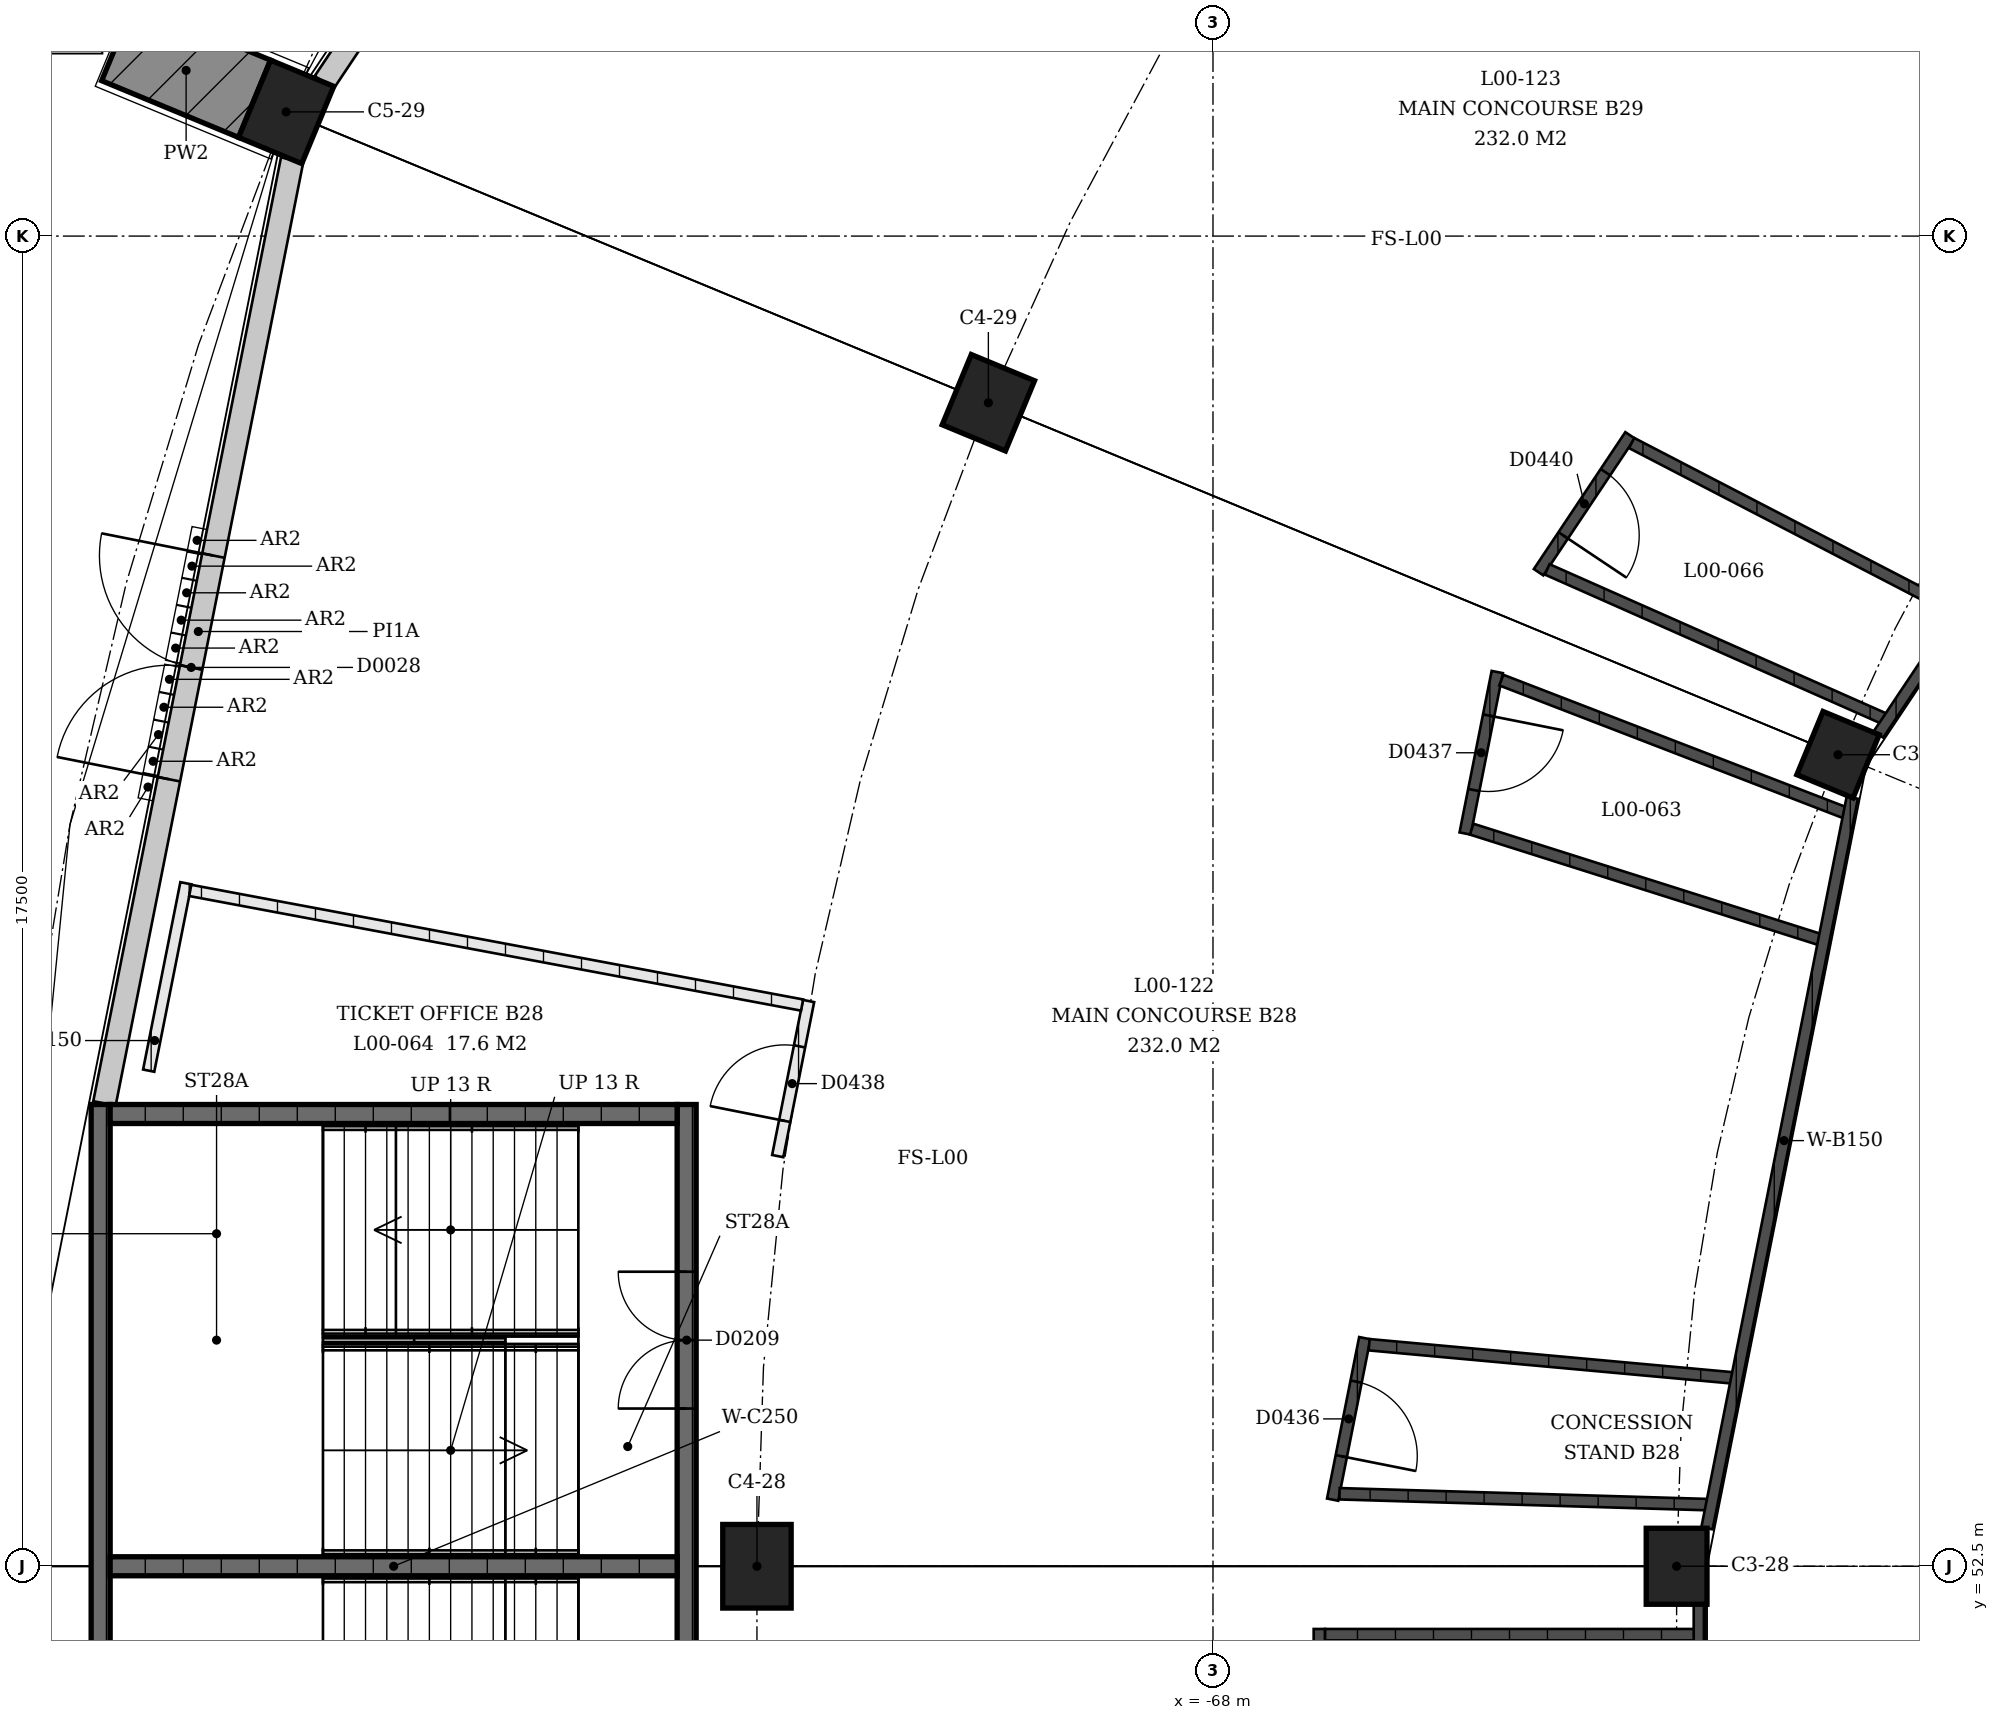
"""IFC4 building model, lengths in metres.
Left out: names, types, materials, properties, quantities, classifications, styles, units other than length and angle.
Written with IfcOpenShell. Run it as: python <this file> out.ifc"""

import sys

from ifc_helpers import new_model, si_unit, direction, frame, frame_2d, origin, origin_2d, place, context, subcontext, project, spatial, rectangle, extrude, element, fill, save


model = new_model("IFC4")
c1 = context("Model", 3, precision=1e-05, world=origin(), true_north=direction((0.0, 1.0)))
c2 = subcontext(c1, "Body", "Model", "MODEL_VIEW")
j1 = project(units=[si_unit("LENGTHUNIT", "METRE"), si_unit("PLANEANGLEUNIT", "RADIAN")], contexts=[c1])
p1 = place(None, origin())
s1 = spatial("IfcSite", under=j1, at=p1, CompositionType="ELEMENT")
p2 = place(p1, origin())
s2 = spatial("IfcBuilding", under=s1, at=p2, CompositionType="ELEMENT")
p3 = place(p2, origin())
s3 = spatial("IfcBuildingStorey", under=s2, at=p3, CompositionType="ELEMENT", Elevation=0.0)
p4 = place(p3, frame((-61.9, 52.5, 0.0), z_axis=(0.0, 0.0, 1.0), x_axis=(0.0, -1.0, 0.0)))
e1 = element("IfcColumn", 1, at=p4, inside=s3, PredefinedType="COLUMN", context=c2, shape_type="SweptSolid", body=[
    extrude(rectangle(XDim=1.0, YDim=0.8, at=origin_2d()), origin(), (0.0, 0.0, 1.0), 4.5),
])
p5 = place(p3, frame((-74.0, 52.5, 0.0), z_axis=(0.0, 0.0, 1.0), x_axis=(0.0, -1.0, 0.0)))
e2 = element("IfcColumn", 2, at=p5, inside=s3, PredefinedType="COLUMN", context=c2, shape_type="SweptSolid", body=[
    extrude(rectangle(XDim=1.1, YDim=0.9, at=origin_2d()), origin(), (0.0, 0.0, 1.0), 4.5),
])
p6 = place(p3, frame((-59.776, 63.177, 0.0), z_axis=(0.0, 0.0, 1.0), x_axis=(-0.382683432365, -0.923879532511, 0.0)))
e3 = element("IfcColumn", 3, at=p6, inside=s3, PredefinedType="COLUMN", context=c2, shape_type="SweptSolid", body=[
    extrude(rectangle(XDim=0.9, YDim=0.8, at=origin_2d()), origin(), (0.0, 0.0, 1.0), 4.5),
])
p7 = place(p3, frame((-70.955, 67.807, 0.0), z_axis=(0.0, 0.0, 1.0), x_axis=(-0.382683432365, -0.923879532511, 0.0)))
e4 = element("IfcColumn", 4, at=p7, inside=s3, PredefinedType="COLUMN", context=c2, shape_type="SweptSolid", body=[
    extrude(rectangle(XDim=1.0, YDim=0.9, at=origin_2d()), origin(), (0.0, 0.0, 1.0), 4.5),
])
p8 = place(p3, frame((-80.194, 71.634, 0.0), z_axis=(0.0, 0.0, 1.0), x_axis=(-0.382683432365, -0.923879532511, 0.0)))
e5 = element("IfcColumn", 5, at=p8, inside=s3, PredefinedType="COLUMN", context=c2, shape_type="SweptSolid", body=[
    extrude(rectangle(XDim=1.1, YDim=0.9, at=origin_2d()), origin(), (0.0, 0.0, 1.0), 4.5),
])
p9 = place(p3, frame((-82.585, 58.589, 0.0), z_axis=(0.0, 0.0, 1.0), x_axis=(0.195099892294, 0.980783376708, 0.0)))
e6 = element("IfcWall", 6, at=p9, inside=s3, PredefinedType="SOLIDWALL", context=c2, shape_type="SweptSolid", body=[
    extrude(rectangle(XDim=12.66, YDim=0.3, at=frame_2d((6.33, 0.0))), origin(), (0.0, 0.0, 1.0), 2.79),
])
p10 = place(p9, frame((4.349, 0.0, 0.0)))
e7 = element("IfcOpeningElement", 7, at=p10, cuts=e6, PredefinedType="OPENING", context=c2, shape_type="SweptSolid", body=[
    extrude(rectangle(XDim=3.0, YDim=2.4, at=frame_2d((1.5, 1.2))), frame((0.0, 0.16, 0.0), z_axis=(0.0, -1.0, 0.0), x_axis=(1.0, 0.0, 0.0)), (0.0, 0.0, 1.0), 0.32),
])
p11 = place(p3, frame((-79.694, 72.022, 0.0), z_axis=(0.0, 0.0, 1.0), x_axis=(0.555575571867, 0.831466044974, 0.0)))
e8 = element("IfcWall", 8, at=p11, inside=s3, PredefinedType="SOLIDWALL", context=c2, shape_type="SweptSolid", body=[
    extrude(rectangle(XDim=12.675, YDim=0.3, at=frame_2d((6.337, 0.0))), origin(), (0.0, 0.0, 1.0), 2.79),
])
p12 = place(p11, frame((4.412, 0.0, 0.0)))
e9 = element("IfcOpeningElement", 9, at=p12, cuts=e8, PredefinedType="OPENING", context=c2, shape_type="SweptSolid", body=[
    extrude(rectangle(XDim=4.8, YDim=2.4, at=frame_2d((2.4, 1.2))), frame((0.0, 0.16, 0.0), z_axis=(0.0, -1.0, 0.0), x_axis=(1.0, 0.0, 0.0)), (0.0, 0.0, 1.0), 0.32),
])
p13 = place(p3, frame((-74.925, 58.575, 0.0), z_axis=(0.0, 0.0, 1.0), x_axis=(0.0, -1.0, 0.0)))
e10 = element("IfcWall", 10, at=p13, inside=s3, PredefinedType="SHEAR", context=c2, shape_type="SweptSolid", body=[
    extrude(rectangle(XDim=12.15, YDim=0.25, at=frame_2d((6.075, 0.0))), origin(), (0.0, 0.0, 1.0), 4.09),
])
p14 = place(p13, frame((2.2, 0.0, 0.0)))
e11 = element("IfcOpeningElement", 11, at=p14, cuts=e10, PredefinedType="OPENING", context=c2, shape_type="SweptSolid", body=[
    extrude(rectangle(XDim=1.8, YDim=2.1, at=frame_2d((0.9, 1.05))), frame((0.0, 0.125, 0.0), z_axis=(0.0, -1.0, 0.0), x_axis=(1.0, 0.0, 0.0)), (0.0, 0.0, 1.0), 0.25),
])
p15 = place(p13, frame((8.15, 0.0, 0.0)))
e12 = element("IfcOpeningElement", 12, at=p15, cuts=e10, PredefinedType="OPENING", context=c2, shape_type="SweptSolid", body=[
    extrude(rectangle(XDim=1.8, YDim=2.1, at=frame_2d((0.9, 1.05))), frame((0.0, 0.125, 0.0), z_axis=(0.0, -1.0, 0.0), x_axis=(1.0, 0.0, 0.0)), (0.0, 0.0, 1.0), 0.25),
])
p16 = place(p3, frame((-82.635, 58.575, 0.0), z_axis=(0.0, 0.0, 1.0), x_axis=(0.0, -1.0, 0.0)))
e13 = element("IfcWall", 13, at=p16, inside=s3, PredefinedType="SHEAR", context=c2, shape_type="SweptSolid", body=[
    extrude(rectangle(XDim=12.15, YDim=0.25, at=frame_2d((6.075, 0.0))), origin(), (0.0, 0.0, 1.0), 4.09),
])
for number, where, z_axis, x_axis in (
    (14, (-75.05, 58.45, 0.0), (0.0, 0.0, 1.0), (-1.0, 0.0, 0.0)),
    (15, (-75.05, 52.5, 0.0), (0.0, 0.0, 1.0), (-1.0, 0.0, 0.0)),
):
    element("IfcWall", number, at=place(p3, frame(where, z_axis=z_axis, x_axis=x_axis)), inside=s3, PredefinedType="SHEAR", context=c2, shape_type="SweptSolid", body=[
        extrude(rectangle(XDim=7.46, YDim=0.25, at=frame_2d((3.73, 0.0))), origin(), (0.0, 0.0, 1.0), 4.09),
    ])
p17 = place(p3, frame((-66.6, 51.675, 0.0), z_axis=(0.0, 0.0, 1.0), x_axis=(0.0, -1.0, 0.0)))
e16 = element("IfcWall", 16, at=p17, inside=s3, PredefinedType="SOLIDWALL", context=c2, shape_type="SweptSolid", body=[
    extrude(rectangle(XDim=4.35, YDim=0.15, at=frame_2d((2.175, 0.0))), origin(), (0.0, 0.0, 1.0), 3.0),
])
p18 = place(p17, frame((1.675, 0.0, 0.0)))
e17 = element("IfcOpeningElement", 17, at=p18, cuts=e16, PredefinedType="OPENING", context=c2, shape_type="SweptSolid", body=[
    extrude(rectangle(XDim=1.0, YDim=2.1, at=frame_2d((0.5, 1.05))), frame((0.0, 0.075, 0.0), z_axis=(0.0, -1.0, 0.0), x_axis=(1.0, 0.0, 0.0)), (0.0, 0.0, 1.0), 0.15),
])
p19 = place(p3, frame((-61.6, 51.6, 0.0), z_axis=(0.0, 0.0, 1.0), x_axis=(-1.0, 0.0, 0.0)))
e18 = element("IfcWall", 18, at=p19, inside=s3, PredefinedType="SOLIDWALL", context=c2, shape_type="SweptSolid", body=[
    extrude(rectangle(XDim=4.925, YDim=0.15, at=frame_2d((2.462, 0.0))), origin(), (0.0, 0.0, 1.0), 3.0),
])
p20 = place(p3, frame((-66.426, 53.376, 0.0), z_axis=(0.0, 0.0, 1.0), x_axis=(0.195184162696, 0.980766609665, 0.0)))
e19 = element("IfcWall", 19, at=p20, inside=s3, PredefinedType="SOLIDWALL", context=c2, shape_type="SweptSolid", body=[
    extrude(rectangle(XDim=2.167, YDim=0.15, at=frame_2d((1.083, 0.0))), origin(), (0.0, 0.0, 1.0), 3.0),
])
p21 = place(p20, frame((0.583, 0.0, 0.0)))
e20 = element("IfcOpeningElement", 20, at=p21, cuts=e19, PredefinedType="OPENING", context=c2, shape_type="SweptSolid", body=[
    extrude(rectangle(XDim=1.0, YDim=2.1, at=frame_2d((0.5, 1.05))), frame((0.0, 0.075, 0.0), z_axis=(0.0, -1.0, 0.0), x_axis=(1.0, 0.0, 0.0)), (0.0, 0.0, 1.0), 0.15),
])
p22 = place(p3, frame((-61.439, 53.309, 0.0), z_axis=(0.0, 0.0, 1.0), x_axis=(-0.999564604057, 0.02950597086, 0.0)))
e21 = element("IfcWall", 21, at=p22, inside=s3, PredefinedType="SOLIDWALL", context=c2, shape_type="SweptSolid", body=[
    extrude(rectangle(XDim=4.898, YDim=0.15, at=frame_2d((2.449, 0.0))), origin(), (0.0, 0.0, 1.0), 3.0),
])
p23 = place(p3, frame((-61.108, 54.973, 0.0), z_axis=(0.0, 0.0, 1.0), x_axis=(-0.995862664096, 0.090871085934, 0.0)))
e22 = element("IfcWall", 22, at=p23, inside=s3, PredefinedType="SOLIDWALL", context=c2, shape_type="SweptSolid", body=[
    extrude(rectangle(XDim=4.857, YDim=0.15, at=frame_2d((2.429, 0.0))), origin(), (0.0, 0.0, 1.0), 3.0),
])
p24 = place(p3, frame((-64.682, 62.14, 0.0), z_axis=(0.0, 0.0, 1.0), x_axis=(0.195075759432, 0.980788176969, 0.0)))
e23 = element("IfcWall", 23, at=p24, inside=s3, PredefinedType="SOLIDWALL", context=c2, shape_type="SweptSolid", body=[
    extrude(rectangle(XDim=2.166, YDim=0.15, at=frame_2d((1.083, 0.0))), origin(), (0.0, 0.0, 1.0), 3.0),
])
p25 = place(p24, frame((0.583, 0.0, 0.0)))
e24 = element("IfcOpeningElement", 24, at=p25, cuts=e23, PredefinedType="OPENING", context=c2, shape_type="SweptSolid", body=[
    extrude(rectangle(XDim=1.0, YDim=2.1, at=frame_2d((0.5, 1.05))), frame((0.0, 0.075, 0.0), z_axis=(0.0, -1.0, 0.0), x_axis=(1.0, 0.0, 0.0)), (0.0, 0.0, 1.0), 0.15),
])
p26 = place(p3, frame((-59.963, 60.729, 0.0), z_axis=(0.0, 0.0, 1.0), x_axis=(-0.953256403352, 0.302162587804, 0.0)))
e25 = element("IfcWall", 25, at=p26, inside=s3, PredefinedType="SOLIDWALL", context=c2, shape_type="SweptSolid", body=[
    extrude(rectangle(XDim=4.86, YDim=0.15, at=frame_2d((2.43, 0.0))), origin(), (0.0, 0.0, 1.0), 3.0),
])
p27 = place(p3, frame((-59.632, 62.393, 0.0), z_axis=(0.0, 0.0, 1.0), x_axis=(-0.932924010437, 0.360073313022, 0.0)))
e26 = element("IfcWall", 26, at=p27, inside=s3, PredefinedType="SOLIDWALL", context=c2, shape_type="SweptSolid", body=[
    extrude(rectangle(XDim=4.903, YDim=0.15, at=frame_2d((2.451, 0.0))), origin(), (0.0, 0.0, 1.0), 3.0),
])
p28 = place(p3, frame((-73.727, 57.896, 0.0), z_axis=(0.0, 0.0, 1.0), x_axis=(0.195055250603, 0.980792255889, 0.0)))
e27 = element("IfcWall", 27, at=p28, inside=s3, PredefinedType="PARTITIONING", context=c2, shape_type="SweptSolid", body=[
    extrude(rectangle(XDim=2.08, YDim=0.15, at=frame_2d((1.04, 0.0))), origin(), (0.0, 0.0, 1.0), 3.0),
])
p29 = place(p28, frame((0.472, 0.0, 0.0)))
e28 = element("IfcOpeningElement", 28, at=p29, cuts=e27, PredefinedType="OPENING", context=c2, shape_type="SweptSolid", body=[
    extrude(rectangle(XDim=1.0, YDim=2.1, at=frame_2d((0.5, 1.05))), frame((0.0, 0.075, 0.0), z_axis=(0.0, -1.0, 0.0), x_axis=(1.0, 0.0, 0.0)), (0.0, 0.0, 1.0), 0.15),
])
p30 = place(p3, frame((-82.003, 59.02, 0.0), z_axis=(0.0, 0.0, 1.0), x_axis=(0.195032666665, 0.980796747004, 0.0)))
e29 = element("IfcWall", 29, at=p30, inside=s3, PredefinedType="PARTITIONING", context=c2, shape_type="SweptSolid", body=[
    extrude(rectangle(XDim=2.514, YDim=0.15, at=frame_2d((1.257, 0.0))), origin(), (0.0, 0.0, 1.0), 3.0),
])
p31 = place(p3, frame((-73.406, 59.883, 0.0), z_axis=(0.0, 0.0, 1.0), x_axis=(-0.982896138411, 0.184160747979, 0.0)))
e30 = element("IfcWall", 30, at=p31, inside=s3, PredefinedType="PARTITIONING", context=c2, shape_type="SweptSolid", body=[
    extrude(rectangle(XDim=8.19, YDim=0.15, at=frame_2d((4.095, 0.0))), origin(), (0.0, 0.0, 1.0), 3.0),
])
p32 = place(p3, frame((-62.512, 67.379, 0.0), z_axis=(0.0, 0.0, 1.0), x_axis=(-0.555584101735, -0.831460345356, 0.0)))
e31 = element("IfcWall", 31, at=p32, inside=s3, PredefinedType="SOLIDWALL", context=c2, shape_type="SweptSolid", body=[
    extrude(rectangle(XDim=2.167, YDim=0.15, at=frame_2d((1.083, 0.0))), origin(), (0.0, 0.0, 1.0), 3.0),
])
p33 = place(p32, frame((0.583, 0.0, 0.0)))
e32 = element("IfcOpeningElement", 32, at=p33, cuts=e31, PredefinedType="OPENING", context=c2, shape_type="SweptSolid", body=[
    extrude(rectangle(XDim=1.0, YDim=2.1, at=frame_2d((0.5, 1.05))), frame((0.0, 0.075, 0.0), z_axis=(0.0, -1.0, 0.0), x_axis=(1.0, 0.0, 0.0)), (0.0, 0.0, 1.0), 0.15),
])
p34 = place(p3, frame((-58.177, 65.04, 0.0), z_axis=(0.0, 0.0, 1.0), x_axis=(-0.887687615618, 0.460446193467, 0.0)))
e33 = element("IfcWall", 33, at=p34, inside=s3, PredefinedType="SOLIDWALL", context=c2, shape_type="SweptSolid", body=[
    extrude(rectangle(XDim=4.86, YDim=0.15, at=frame_2d((2.43, 0.0))), origin(), (0.0, 0.0, 1.0), 3.0),
])
p35 = place(p3, frame((-59.12, 63.629, 0.0), z_axis=(0.0, 0.0, 1.0), x_axis=(-0.914272991352, 0.405098626615, 0.0)))
e34 = element("IfcWall", 34, at=p35, inside=s3, PredefinedType="SOLIDWALL", context=c2, shape_type="SweptSolid", body=[
    extrude(rectangle(XDim=4.903, YDim=0.15, at=frame_2d((2.451, 0.0))), origin(), (0.0, 0.0, 1.0), 3.0),
])
p36 = place(p3, frame((-61.6, 37.9, 0.0), z_axis=(0.0, 0.0, 1.0), x_axis=(0.0, 1.0, 0.0)))
e35 = element("IfcWall", 35, at=p36, inside=s3, PredefinedType="SOLIDWALL", context=c2, shape_type="SweptSolid", body=[
    extrude(rectangle(XDim=14.1, YDim=0.15, at=frame_2d((7.05, 0.0))), origin(), (0.0, 0.0, 1.0), 3.0),
])
p37 = place(p36, frame((5.9, 0.0, 0.0)))
e36 = element("IfcOpeningElement", 36, at=p37, cuts=e35, PredefinedType="OPENING", context=c2, shape_type="SweptSolid", body=[
    extrude(rectangle(XDim=2.4, YDim=2.4, at=frame_2d((1.2, 1.2))), frame((0.0, 0.075, 0.0), z_axis=(0.0, -1.0, 0.0), x_axis=(1.0, 0.0, 0.0)), (0.0, 0.0, 1.0), 0.15),
])
p38 = place(p3, frame((-61.5, 53.0, 0.0), z_axis=(0.0, 0.0, 1.0), x_axis=(0.195081244333, 0.980787086023, 0.0)))
e37 = element("IfcWall", 37, at=p38, inside=s3, PredefinedType="SOLIDWALL", context=c2, shape_type="SweptSolid", body=[
    extrude(rectangle(XDim=9.8, YDim=0.15, at=frame_2d((4.9, 0.0))), origin(), (0.0, 0.0, 1.0), 3.0),
])
p39 = place(p3, frame((-59.244, 63.444, 0.0), z_axis=(0.0, 0.0, 1.0), x_axis=(0.555569179667, 0.83147031613, 0.0)))
e38 = element("IfcWall", 38, at=p39, inside=s3, PredefinedType="SOLIDWALL", context=c2, shape_type="SweptSolid", body=[
    extrude(rectangle(XDim=9.851, YDim=0.15, at=frame_2d((4.926, 0.0))), origin(), (0.0, 0.0, 1.0), 3.0),
])
p40 = place(p39, frame((3.756, 0.0, 0.0)))
e39 = element("IfcOpeningElement", 39, at=p40, cuts=e38, PredefinedType="OPENING", context=c2, shape_type="SweptSolid", body=[
    extrude(rectangle(XDim=2.4, YDim=2.4, at=frame_2d((1.2, 1.2))), frame((0.0, 0.075, 0.0), z_axis=(0.0, -1.0, 0.0), x_axis=(1.0, 0.0, 0.0)), (0.0, 0.0, 1.0), 0.15),
])
p41 = place(p10, origin())
e40 = element("IfcDoor", 40, at=p41, inside=s3, OperationType="DOUBLE_DOOR_SINGLE_SWING", PredefinedType="DOOR", context=c2, shape_type="SweptSolid", body=[
    extrude(rectangle(XDim=3.0, YDim=2.4, at=frame_2d((1.5, 1.2))), frame((0.0, 0.025, 0.0), z_axis=(0.0, -1.0, 0.0), x_axis=(1.0, 0.0, 0.0)), (0.0, 0.0, 1.0), 0.05),
])
fill(e7, e40)
p42 = place(p14, origin())
e41 = element("IfcDoor", 41, at=p42, inside=s3, OperationType="DOUBLE_DOOR_SINGLE_SWING", PredefinedType="DOOR", context=c2, shape_type="SweptSolid", body=[
    extrude(rectangle(XDim=1.8, YDim=2.1, at=frame_2d((0.9, 1.05))), frame((0.0, 0.025, 0.0), z_axis=(0.0, -1.0, 0.0), x_axis=(1.0, 0.0, 0.0)), (0.0, 0.0, 1.0), 0.05),
])
fill(e11, e41)
p43 = place(p21, origin())
e42 = element("IfcDoor", 42, at=p43, inside=s3, OperationType="SINGLE_SWING_LEFT", PredefinedType="DOOR", context=c2, shape_type="SweptSolid", body=[
    extrude(rectangle(XDim=1.0, YDim=2.1, at=frame_2d((0.5, 1.05))), frame((0.0, 0.025, 0.0), z_axis=(0.0, -1.0, 0.0), x_axis=(1.0, 0.0, 0.0)), (0.0, 0.0, 1.0), 0.05),
])
fill(e20, e42)
p44 = place(p25, origin())
e43 = element("IfcDoor", 43, at=p44, inside=s3, OperationType="SINGLE_SWING_RIGHT", PredefinedType="DOOR", context=c2, shape_type="SweptSolid", body=[
    extrude(rectangle(XDim=1.0, YDim=2.1, at=frame_2d((0.5, 1.05))), frame((0.0, 0.025, 0.0), z_axis=(0.0, -1.0, 0.0), x_axis=(1.0, 0.0, 0.0)), (0.0, 0.0, 1.0), 0.05),
])
fill(e24, e43)
p45 = place(p29, origin())
e44 = element("IfcDoor", 44, at=p45, inside=s3, OperationType="SINGLE_SWING_RIGHT", PredefinedType="DOOR", context=c2, shape_type="SweptSolid", body=[
    extrude(rectangle(XDim=1.0, YDim=2.1, at=frame_2d((0.5, 1.05))), frame((0.0, 0.025, 0.0), z_axis=(0.0, -1.0, 0.0), x_axis=(1.0, 0.0, 0.0)), (0.0, 0.0, 1.0), 0.05),
])
fill(e28, e44)
p46 = place(p33, origin())
e45 = element("IfcDoor", 45, at=p46, inside=s3, OperationType="SINGLE_SWING_LEFT", PredefinedType="DOOR", context=c2, shape_type="SweptSolid", body=[
    extrude(rectangle(XDim=1.0, YDim=2.1, at=frame_2d((0.5, 1.05))), frame((0.0, 0.025, 0.0), z_axis=(0.0, -1.0, 0.0), x_axis=(1.0, 0.0, 0.0)), (0.0, 0.0, 1.0), 0.05),
])
fill(e32, e45)
save(model, sys.argv[1])
